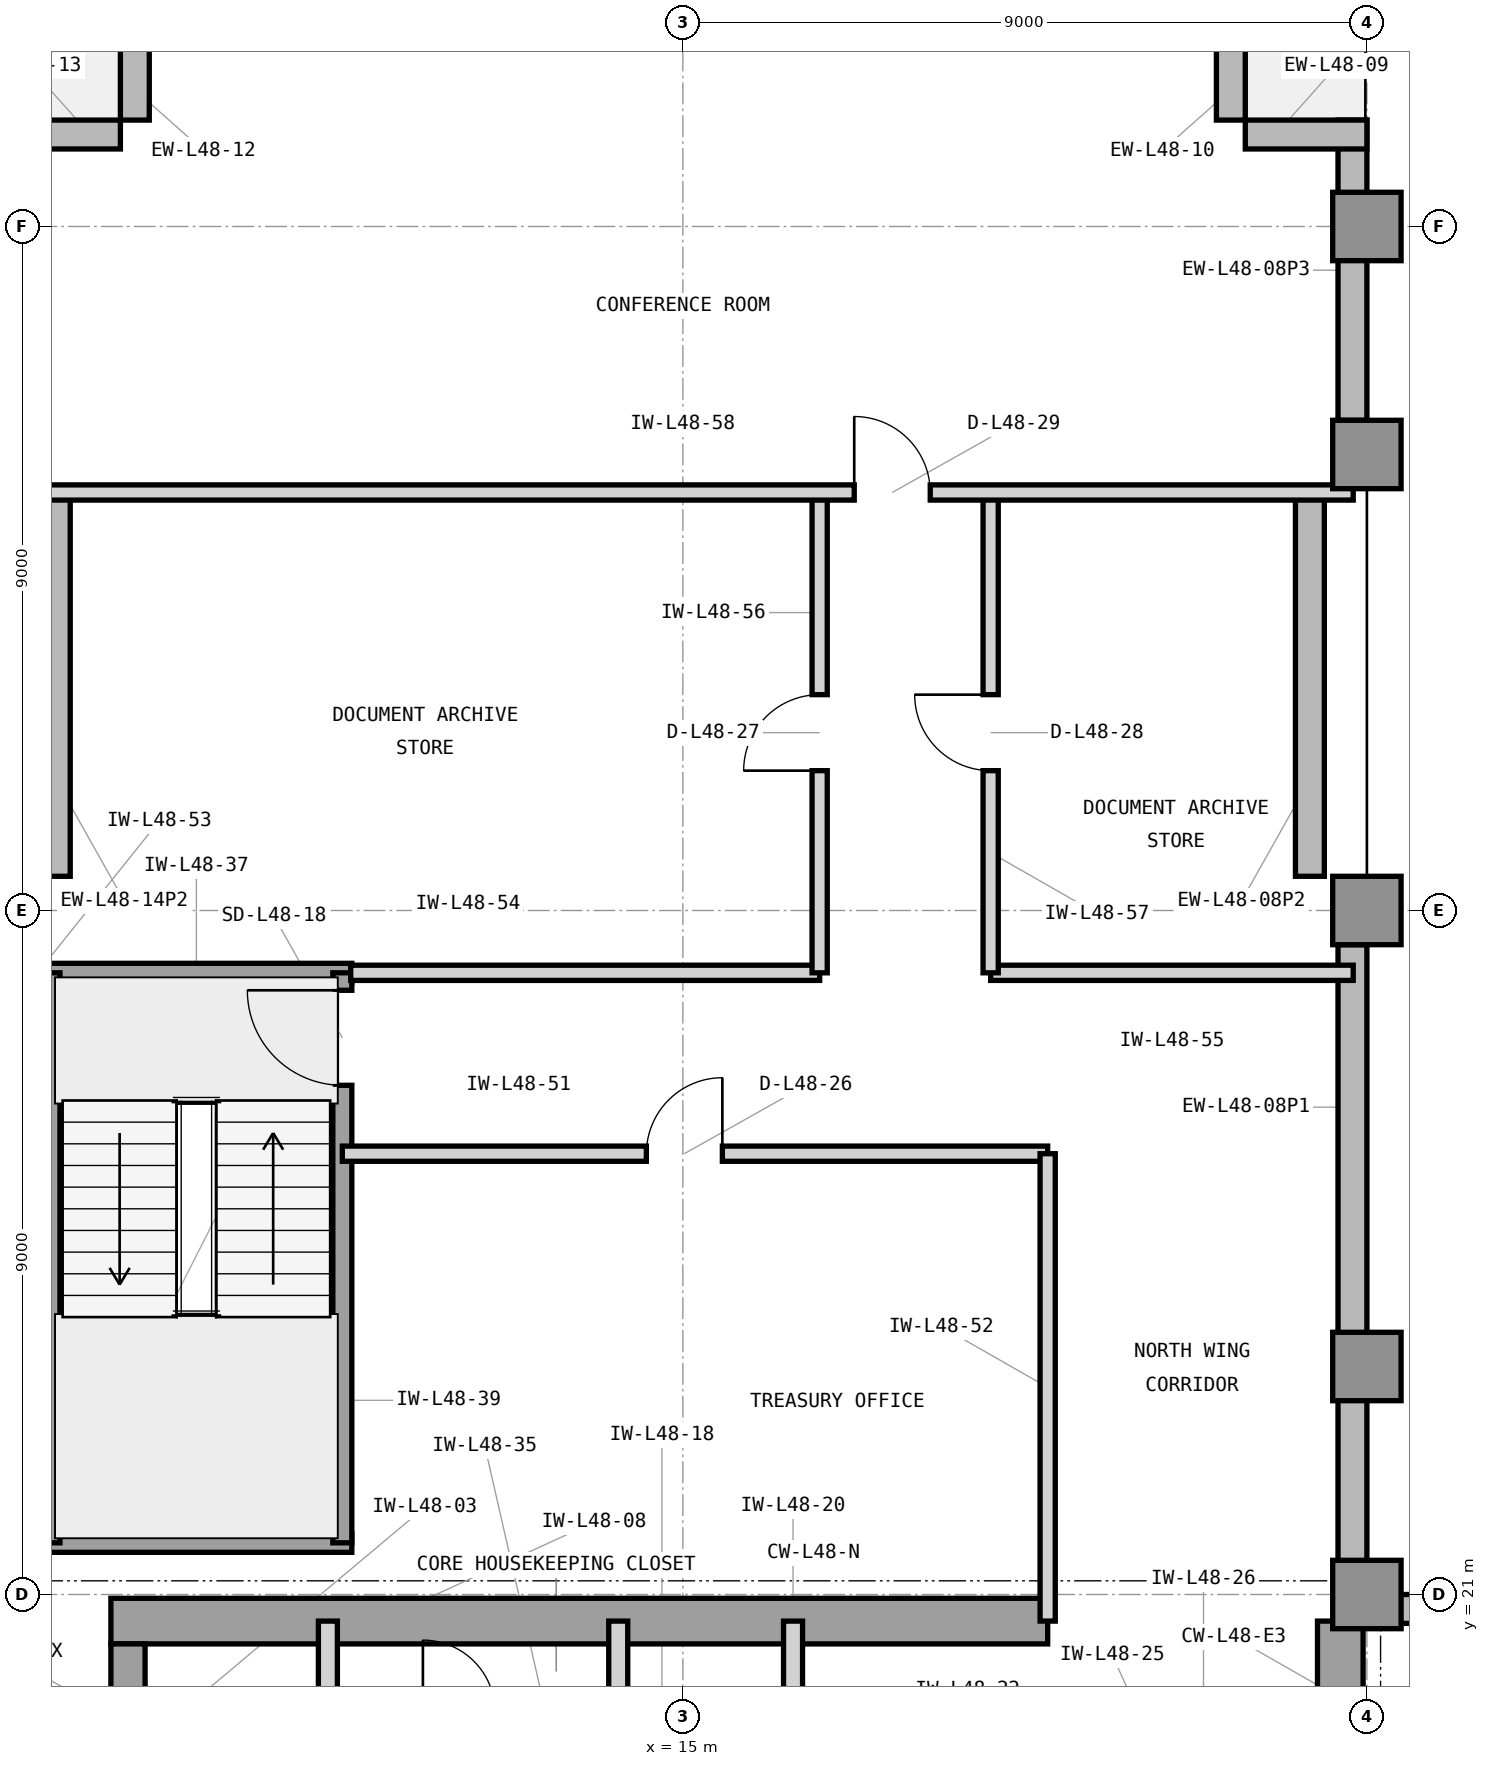
"""IFC4 building model, lengths in metres.
Left out: names, types, materials, properties, quantities, classifications, styles, units other than length and angle.
Written with IfcOpenShell. Run it as: python <this file> out.ifc"""

import sys

from ifc_helpers import new_model, si_unit, direction, frame, frame_2d, origin, origin_2d, place, context, subcontext, project, spatial, rectangle, extrude, element, fill, save


model = new_model("IFC4")
c1 = context("Model", 3, precision=1e-05, world=origin(), true_north=direction((0.0, 1.0)))
c2 = subcontext(c1, "Body", "Model", "MODEL_VIEW")
j1 = project(units=[si_unit("LENGTHUNIT", "METRE"), si_unit("PLANEANGLEUNIT", "RADIAN")], contexts=[c1])
p1 = place(None, origin())
s1 = spatial("IfcSite", under=j1, at=p1, CompositionType="ELEMENT")
p2 = place(p1, origin())
s2 = spatial("IfcBuilding", under=s1, at=p2, CompositionType="ELEMENT")
p3 = place(p2, frame((0.0, 0.0, 199.5)))
s3 = spatial("IfcBuildingStorey", under=s2, at=p3, CompositionType="ELEMENT", Elevation=199.5)
p4 = place(p3, frame((7.475, 20.65, 0.0), z_axis=(0.0, 0.0, 1.0), x_axis=(1.0, 0.0, 0.0)))
e1 = element("IfcWall", 1, at=p4, inside=s3, PredefinedType="SHEAR", context=c2, shape_type="SweptSolid", body=[
    extrude(rectangle(XDim=12.325, YDim=0.6, at=frame_2d((6.163, 0.0))), origin(), (0.0, 0.0, 1.0), 3.9),
])
p5 = place(p3, frame((23.65, 16.6, 0.0), z_axis=(0.0, 0.0, 1.0), x_axis=(0.0, 1.0, 0.0)))
e2 = element("IfcWall", 2, at=p5, inside=s3, PredefinedType="SHEAR", context=c2, shape_type="SweptSolid", body=[
    extrude(rectangle(XDim=4.05, YDim=0.6, at=frame_2d((2.025, 0.0))), origin(), (0.0, 0.0, 1.0), 3.9),
])
p6 = place(p3, frame((7.7, 19.575, 0.0), z_axis=(0.0, 0.0, 1.0), x_axis=(0.0, 1.0, 0.0)))
e3 = element("IfcWall", 3, at=p6, inside=s3, PredefinedType="SHEAR", context=c2, shape_type="SweptSolid", body=[
    extrude(rectangle(XDim=0.775, YDim=0.45, at=frame_2d((0.388, 0.0))), origin(), (0.0, 0.0, 1.0), 3.9),
])
for number, where, z_axis, x_axis in (
    (4, (24.0, 21.0, 0.0), (0.0, 0.0, 1.0), (1.0, 0.0, 0.0)),
    (5, (24.0, 24.0, 0.0), (0.0, 0.0, 1.0), (1.0, 0.0, 0.0)),
    (6, (24.0, 30.0, 0.0), (0.0, 0.0, 1.0), (1.0, 0.0, 0.0)),
    (7, (24.0, 36.0, 0.0), (0.0, 0.0, 1.0), (1.0, 0.0, 0.0)),
    (8, (24.0, 39.0, 0.0), (0.0, 0.0, 1.0), (1.0, 0.0, 0.0)),
):
    element("IfcColumn", number, at=place(p3, frame(where, z_axis=z_axis, x_axis=x_axis)), inside=s3, PredefinedType="COLUMN", context=c2, shape_type="SweptSolid", body=[
        extrude(rectangle(XDim=0.9, YDim=0.9, at=origin_2d()), origin(), (0.0, 0.0, 1.0), 3.9),
    ])
p7 = place(p3, frame((55.4, 20.81, 0.0), z_axis=(0.0, 0.0, 1.0), x_axis=(-1.0, 0.0, 0.0)))
e9 = element("IfcWall", 9, at=p7, inside=s3, PredefinedType="STANDARD", context=c2, shape_type="SweptSolid", body=[
    extrude(rectangle(XDim=31.4, YDim=0.38, at=frame_2d((15.7, 0.0))), origin(), (0.0, 0.0, 1.0), 3.7),
])
p8 = place(p7, frame((17.167, 0.0, 0.9)))
e10 = element("IfcOpeningElement", 10, at=p8, cuts=e9, PredefinedType="OPENING", context=c2, shape_type="SweptSolid", body=[
    extrude(rectangle(XDim=2.3, YDim=2.2, at=frame_2d((1.15, 1.1))), frame((0.0, 0.2, 0.0), z_axis=(0.0, -1.0, 0.0), x_axis=(1.0, 0.0, 0.0)), (0.0, 0.0, 1.0), 0.4),
])
p9 = place(p7, frame((29.034, 0.0, 0.9)))
e11 = element("IfcOpeningElement", 11, at=p9, cuts=e9, PredefinedType="OPENING", context=c2, shape_type="SweptSolid", body=[
    extrude(rectangle(XDim=1.6, YDim=2.2, at=frame_2d((0.8, 1.1))), frame((0.0, 0.2, 0.0), z_axis=(0.0, -1.0, 0.0), x_axis=(1.0, 0.0, 0.0)), (0.0, 0.0, 1.0), 0.4),
])
p10 = place(p7, frame((8.904, 0.0, 0.9)))
e12 = element("IfcOpeningElement", 12, at=p10, cuts=e9, PredefinedType="OPENING", context=c2, shape_type="SweptSolid", body=[
    extrude(rectangle(XDim=2.3, YDim=2.2, at=frame_2d((1.15, 1.1))), frame((0.0, 0.2, 0.0), z_axis=(0.0, -1.0, 0.0), x_axis=(1.0, 0.0, 0.0)), (0.0, 0.0, 1.0), 0.4),
])
p11 = place(p3, frame((23.81, 21.0, 0.0), z_axis=(0.0, 0.0, 1.0), x_axis=(0.0, 1.0, 0.0)))
e13 = element("IfcWall", 13, at=p11, inside=s3, PredefinedType="STANDARD", context=c2, shape_type="SweptSolid", body=[
    extrude(rectangle(XDim=8.55, YDim=0.38, at=frame_2d((4.275, 0.0))), origin(), (0.0, 0.0, 1.0), 3.7),
])
p12 = place(p3, frame((23.25, 30.45, 0.0), z_axis=(0.0, 0.0, 1.0), x_axis=(0.0, 1.0, 0.0)))
e14 = element("IfcWall", 14, at=p12, inside=s3, PredefinedType="STANDARD", context=c2, shape_type="SweptSolid", body=[
    extrude(rectangle(XDim=5.1, YDim=0.38, at=frame_2d((2.55, 0.0))), origin(), (0.0, 0.0, 1.0), 3.7),
])
p13 = place(p3, frame((23.81, 36.45, 0.0), z_axis=(0.0, 0.0, 1.0), x_axis=(0.0, 1.0, 0.0)))
e15 = element("IfcWall", 15, at=p13, inside=s3, PredefinedType="STANDARD", context=c2, shape_type="SweptSolid", body=[
    extrude(rectangle(XDim=3.95, YDim=0.38, at=frame_2d((1.975, 0.0))), origin(), (0.0, 0.0, 1.0), 3.7),
])
for number, where, z_axis, x_axis in (
    (16, (24.0, 40.21, 0.0), (0.0, 0.0, 1.0), (-1.0, 0.0, 0.0)),
    (17, (22.21, 40.4, 0.0), (0.0, 0.0, 1.0), (0.0, 1.0, 0.0)),
    (18, (7.79, 42.0, 0.0), (0.0, 0.0, 1.0), (0.0, -1.0, 0.0)),
    (19, (7.6, 40.21, 0.0), (0.0, 0.0, 1.0), (-1.0, 0.0, 0.0)),
):
    element("IfcWall", number, at=place(p3, frame(where, z_axis=z_axis, x_axis=x_axis)), inside=s3, PredefinedType="STANDARD", context=c2, shape_type="SweptSolid", body=[
        extrude(rectangle(XDim=1.6, YDim=0.38, at=frame_2d((0.8, 0.0))), origin(), (0.0, 0.0, 1.0), 3.7),
    ])
p14 = place(p3, frame((6.75, 35.55, 0.0), z_axis=(0.0, 0.0, 1.0), x_axis=(0.0, -1.0, 0.0)))
e20 = element("IfcWall", 20, at=p14, inside=s3, PredefinedType="STANDARD", context=c2, shape_type="SweptSolid", body=[
    extrude(rectangle(XDim=5.1, YDim=0.38, at=frame_2d((2.55, 0.0))), origin(), (0.0, 0.0, 1.0), 3.7),
])
p15 = place(p3, frame((10.33, 19.45, 0.0), z_axis=(0.0, 0.0, 1.0), x_axis=(0.0, 1.0, 0.0)))
e21 = element("IfcWall", 21, at=p15, inside=s3, PredefinedType="PARTITIONING", context=c2, shape_type="SweptSolid", body=[
    extrude(rectangle(XDim=1.2, YDim=0.25, at=frame_2d((0.6, 0.0))), origin(), (0.0, 0.0, 1.0), 3.69),
])
for number, where, z_axis, x_axis in (
    (22, (14.15, 16.7, 0.0), (0.0, 0.0, 1.0), (0.0, 1.0, 0.0)),
    (23, (16.45, 16.7, 0.0), (0.0, 0.0, 1.0), (0.0, 1.0, 0.0)),
):
    element("IfcWall", number, at=place(p3, frame(where, z_axis=z_axis, x_axis=x_axis)), inside=s3, PredefinedType="PARTITIONING", context=c2, shape_type="SweptSolid", body=[
        extrude(rectangle(XDim=3.95, YDim=0.25, at=frame_2d((1.975, 0.0))), origin(), (0.0, 0.0, 1.0), 3.69),
    ])
for number, where, z_axis, x_axis in (
    (24, (6.555, 21.68, 0.0), (0.0, 0.0, 1.0), (1.0, 0.0, 0.0)),
    (25, (6.555, 29.18, 0.0), (0.0, 0.0, 1.0), (1.0, 0.0, 0.0)),
):
    element("IfcWall", number, at=place(p3, frame(where, z_axis=z_axis, x_axis=x_axis)), inside=s3, PredefinedType="SHEAR", context=c2, shape_type="SweptSolid", body=[
        extrude(rectangle(XDim=4.09, YDim=0.25, at=frame_2d((2.045, 0.0))), origin(), (0.0, 0.0, 1.0), 3.9),
    ])
p16 = place(p3, frame((6.68, 21.68, 0.0), z_axis=(0.0, 0.0, 1.0), x_axis=(0.0, 1.0, 0.0)))
e26 = element("IfcWall", 26, at=p16, inside=s3, PredefinedType="SHEAR", context=c2, shape_type="SweptSolid", body=[
    extrude(rectangle(XDim=7.5, YDim=0.25, at=frame_2d((3.75, 0.0))), origin(), (0.0, 0.0, 1.0), 3.9),
])
p17 = place(p3, frame((10.52, 21.68, 0.0), z_axis=(0.0, 0.0, 1.0), x_axis=(0.0, 1.0, 0.0)))
e27 = element("IfcWall", 27, at=p17, inside=s3, PredefinedType="SHEAR", context=c2, shape_type="SweptSolid", body=[
    extrude(rectangle(XDim=7.5, YDim=0.25, at=frame_2d((3.75, 0.0))), origin(), (0.0, 0.0, 1.0), 3.9),
])
p18 = place(p17, frame((6.02, 0.0, 0.0)))
e28 = element("IfcOpeningElement", 28, at=p18, cuts=e27, PredefinedType="OPENING", context=c2, shape_type="SweptSolid", body=[
    extrude(rectangle(XDim=1.25, YDim=2.2, at=frame_2d((0.625, 1.1))), frame((0.0, 0.135, 0.0), z_axis=(0.0, -1.0, 0.0), x_axis=(1.0, 0.0, 0.0)), (0.0, 0.0, 1.0), 0.27),
])
p19 = place(p3, frame((10.52, 26.8, 0.0), z_axis=(0.0, 0.0, 1.0), x_axis=(1.0, 0.0, 0.0)))
e29 = element("IfcWall", 29, at=p19, inside=s3, PredefinedType="PARTITIONING", context=c2, shape_type="SweptSolid", body=[
    extrude(rectangle(XDim=9.28, YDim=0.2, at=frame_2d((4.64, 0.0))), origin(), (0.0, 0.0, 1.0), 3.69),
])
p20 = place(p19, frame((4.0, 0.0, 0.0)))
e30 = element("IfcOpeningElement", 30, at=p20, cuts=e29, PredefinedType="OPENING", context=c2, shape_type="SweptSolid", body=[
    extrude(rectangle(XDim=1.0, YDim=2.15, at=frame_2d((0.5, 1.075))), frame((0.0, 0.11, 0.0), z_axis=(0.0, -1.0, 0.0), x_axis=(1.0, 0.0, 0.0)), (0.0, 0.0, 1.0), 0.22),
])
p21 = place(p3, frame((19.8, 20.65, 0.0), z_axis=(0.0, 0.0, 1.0), x_axis=(0.0, 1.0, 0.0)))
e31 = element("IfcWall", 31, at=p21, inside=s3, PredefinedType="PARTITIONING", context=c2, shape_type="SweptSolid", body=[
    extrude(rectangle(XDim=6.15, YDim=0.2, at=frame_2d((3.075, 0.0))), origin(), (0.0, 0.0, 1.0), 3.69),
])
p22 = place(p3, frame((10.63, 29.18, 0.0), z_axis=(0.0, 0.0, 1.0), x_axis=(1.0, 0.0, 0.0)))
e32 = element("IfcWall", 32, at=p22, inside=s3, PredefinedType="PARTITIONING", context=c2, shape_type="SweptSolid", body=[
    extrude(rectangle(XDim=6.17, YDim=0.2, at=frame_2d((3.085, 0.0))), origin(), (0.0, 0.0, 1.0), 3.69),
])
p23 = place(p3, frame((19.05, 29.18, 0.0), z_axis=(0.0, 0.0, 1.0), x_axis=(1.0, 0.0, 0.0)))
e33 = element("IfcWall", 33, at=p23, inside=s3, PredefinedType="PARTITIONING", context=c2, shape_type="SweptSolid", body=[
    extrude(rectangle(XDim=4.77, YDim=0.2, at=frame_2d((2.385, 0.0))), origin(), (0.0, 0.0, 1.0), 3.69),
])
p24 = place(p3, frame((16.8, 29.18, 0.0), z_axis=(0.0, 0.0, 1.0), x_axis=(0.0, 1.0, 0.0)))
e34 = element("IfcWall", 34, at=p24, inside=s3, PredefinedType="PARTITIONING", context=c2, shape_type="SweptSolid", body=[
    extrude(rectangle(XDim=6.32, YDim=0.2, at=frame_2d((3.16, 0.0))), origin(), (0.0, 0.0, 1.0), 3.69),
])
p25 = place(p24, frame((2.66, 0.0, 0.0)))
e35 = element("IfcOpeningElement", 35, at=p25, cuts=e34, PredefinedType="OPENING", context=c2, shape_type="SweptSolid", body=[
    extrude(rectangle(XDim=1.0, YDim=2.15, at=frame_2d((0.5, 1.075))), frame((0.0, 0.11, 0.0), z_axis=(0.0, -1.0, 0.0), x_axis=(1.0, 0.0, 0.0)), (0.0, 0.0, 1.0), 0.22),
])
p26 = place(p3, frame((19.05, 29.18, 0.0), z_axis=(0.0, 0.0, 1.0), x_axis=(0.0, 1.0, 0.0)))
e36 = element("IfcWall", 36, at=p26, inside=s3, PredefinedType="PARTITIONING", context=c2, shape_type="SweptSolid", body=[
    extrude(rectangle(XDim=6.32, YDim=0.2, at=frame_2d((3.16, 0.0))), origin(), (0.0, 0.0, 1.0), 3.69),
])
p27 = place(p26, frame((2.66, 0.0, 0.0)))
e37 = element("IfcOpeningElement", 37, at=p27, cuts=e36, PredefinedType="OPENING", context=c2, shape_type="SweptSolid", body=[
    extrude(rectangle(XDim=1.0, YDim=2.15, at=frame_2d((0.5, 1.075))), frame((0.0, 0.11, 0.0), z_axis=(0.0, -1.0, 0.0), x_axis=(1.0, 0.0, 0.0)), (0.0, 0.0, 1.0), 0.22),
])
p28 = place(p3, frame((6.18, 35.5, 0.0), z_axis=(0.0, 0.0, 1.0), x_axis=(1.0, 0.0, 0.0)))
e38 = element("IfcWall", 38, at=p28, inside=s3, PredefinedType="PARTITIONING", context=c2, shape_type="SweptSolid", body=[
    extrude(rectangle(XDim=17.64, YDim=0.2, at=frame_2d((8.82, 0.0))), origin(), (0.0, 0.0, 1.0), 3.69),
])
p29 = place(p28, frame((11.075, 0.0, 0.0)))
e39 = element("IfcOpeningElement", 39, at=p29, cuts=e38, PredefinedType="OPENING", context=c2, shape_type="SweptSolid", body=[
    extrude(rectangle(XDim=1.0, YDim=2.15, at=frame_2d((0.5, 1.075))), frame((0.0, 0.11, 0.0), z_axis=(0.0, -1.0, 0.0), x_axis=(1.0, 0.0, 0.0)), (0.0, 0.0, 1.0), 0.22),
])
p30 = place(p18, origin())
e40 = element("IfcDoor", 40, at=p30, inside=s3, OperationType="SINGLE_SWING_RIGHT", PredefinedType="DOOR", context=c2, shape_type="SweptSolid", body=[
    extrude(rectangle(XDim=1.25, YDim=2.2, at=frame_2d((0.625, 1.1))), frame((0.0, 0.025, 0.0), z_axis=(0.0, -1.0, 0.0), x_axis=(1.0, 0.0, 0.0)), (0.0, 0.0, 1.0), 0.05),
])
fill(e28, e40)
p31 = place(p20, origin())
e41 = element("IfcDoor", 41, at=p31, inside=s3, OperationType="SINGLE_SWING_RIGHT", PredefinedType="DOOR", context=c2, shape_type="SweptSolid", body=[
    extrude(rectangle(XDim=1.0, YDim=2.15, at=frame_2d((0.5, 1.075))), frame((0.0, 0.025, 0.0), z_axis=(0.0, -1.0, 0.0), x_axis=(1.0, 0.0, 0.0)), (0.0, 0.0, 1.0), 0.05),
])
fill(e30, e41)
p32 = place(p25, origin())
e42 = element("IfcDoor", 42, at=p32, inside=s3, OperationType="SINGLE_SWING_LEFT", PredefinedType="DOOR", context=c2, shape_type="SweptSolid", body=[
    extrude(rectangle(XDim=1.0, YDim=2.15, at=frame_2d((0.5, 1.075))), frame((0.0, 0.025, 0.0), z_axis=(0.0, -1.0, 0.0), x_axis=(1.0, 0.0, 0.0)), (0.0, 0.0, 1.0), 0.05),
])
fill(e35, e42)
p33 = place(p27, origin())
e43 = element("IfcDoor", 43, at=p33, inside=s3, OperationType="SINGLE_SWING_RIGHT", PredefinedType="DOOR", context=c2, shape_type="SweptSolid", body=[
    extrude(rectangle(XDim=1.0, YDim=2.15, at=frame_2d((0.5, 1.075))), frame((0.0, 0.025, 0.0), z_axis=(0.0, -1.0, 0.0), x_axis=(1.0, 0.0, 0.0)), (0.0, 0.0, 1.0), 0.05),
])
fill(e37, e43)
p34 = place(p29, origin())
e44 = element("IfcDoor", 44, at=p34, inside=s3, OperationType="SINGLE_SWING_LEFT", PredefinedType="DOOR", context=c2, shape_type="SweptSolid", body=[
    extrude(rectangle(XDim=1.0, YDim=2.15, at=frame_2d((0.5, 1.075))), frame((0.0, 0.025, 0.0), z_axis=(0.0, -1.0, 0.0), x_axis=(1.0, 0.0, 0.0)), (0.0, 0.0, 1.0), 0.05),
])
fill(e39, e44)
save(model, sys.argv[1])
